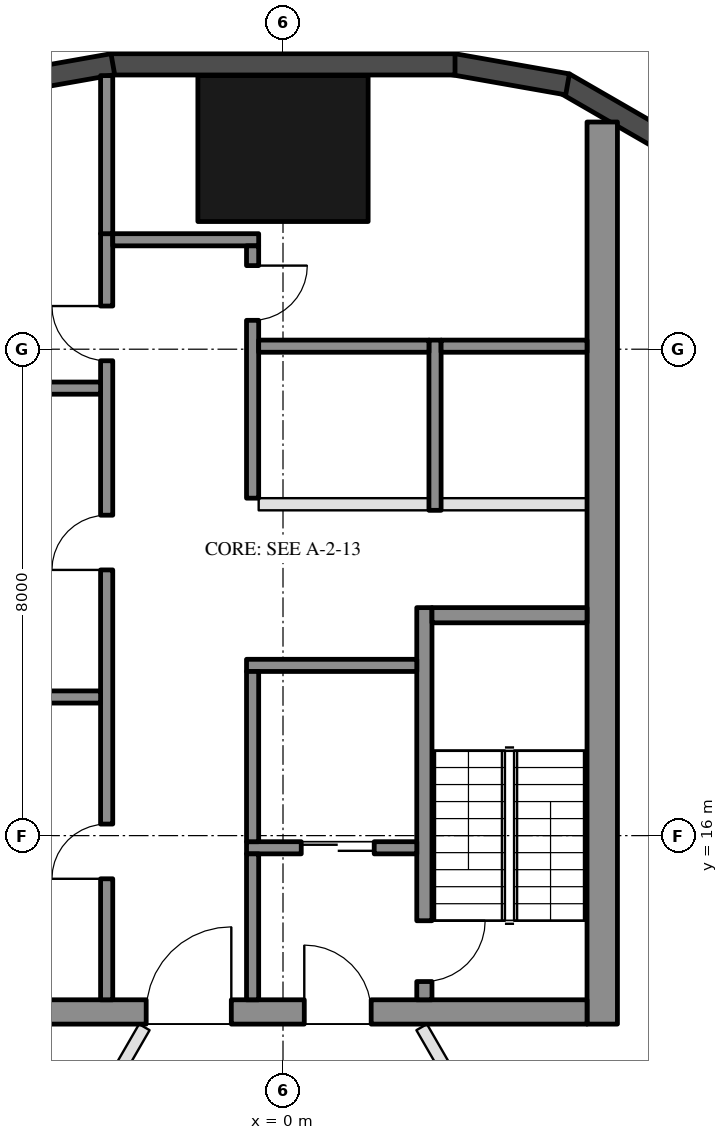
"""IFC4 building model, lengths in metres.
Left out: names, types, materials, properties, quantities, classifications, styles, units other than length and angle.
Written with IfcOpenShell. Run it as: python <this file> out.ifc"""

import sys

from ifc_helpers import new_model, si_unit, direction, frame, frame_2d, origin, origin_2d, place, context, subcontext, project, spatial, rectangle, hollow_rectangle, extrude, element, fill, save


model = new_model("IFC4")
c1 = context("Model", 3, precision=1e-05, world=origin(), true_north=direction((0.0, 1.0)))
c2 = subcontext(c1, "Body", "Model", "MODEL_VIEW")
j1 = project(units=[si_unit("LENGTHUNIT", "METRE"), si_unit("PLANEANGLEUNIT", "RADIAN")], contexts=[c1])
p1 = place(None, origin())
s1 = spatial("IfcSite", under=j1, at=p1, CompositionType="ELEMENT")
p2 = place(p1, origin())
s2 = spatial("IfcBuilding", under=s1, at=p2, CompositionType="ELEMENT")
p3 = place(p2, frame((0.0, 0.0, 65.0)))
s3 = spatial("IfcBuildingStorey", under=s2, at=p3, CompositionType="ELEMENT", Elevation=65.0)
p4 = place(p3, frame((0.0, 27.3, 0.0), z_axis=(0.0, 0.0, 1.0), x_axis=(1.0, 0.0, 0.0)))
e1 = element("IfcColumn", 1, at=p4, inside=s3, PredefinedType="COLUMN", context=c2, shape_type="SweptSolid", body=[
    extrude(hollow_rectangle(XDim=2.8, YDim=2.4, WallThickness=0.07, at=origin_2d()), origin(), (0.0, 0.0, 1.0), 3.7),
])
for number, where, z_axis, x_axis in (
    (2, (6.277, 27.422, 0.0), (0.0, 0.0, 1.0), (-0.866, 0.5, 0.0)),
    (3, (4.68, 28.356, 0.0), (0.0, 0.0, 1.0), (-0.985, 0.174, 0.0)),
):
    element("IfcWall", number, at=place(p3, frame(where, z_axis=z_axis, x_axis=x_axis)), inside=s3, PredefinedType="SOLIDWALL", context=c2, shape_type="SweptSolid", body=[
        extrude(rectangle(XDim=1.91, YDim=0.35, at=frame_2d((0.955, 0.0))), origin(), (0.0, 0.0, 1.0), 3.55),
    ])
p5 = place(p3, frame((2.829, 28.685, 0.0), z_axis=(0.0, 0.0, 1.0), x_axis=(-1.0, 0.0, 0.0)))
e4 = element("IfcWall", 4, at=p5, inside=s3, PredefinedType="SOLIDWALL", context=c2, shape_type="SweptSolid", body=[
    extrude(rectangle(XDim=5.658, YDim=0.35, at=frame_2d((2.829, 0.0))), origin(), (0.0, 0.0, 1.0), 3.55),
])
p6 = place(p3, frame((-2.799, 28.688, 0.0), z_axis=(0.0, 0.0, 1.0), x_axis=(-0.984798995425, -0.173697837091, 0.0)))
e5 = element("IfcWall", 5, at=p6, inside=s3, PredefinedType="SOLIDWALL", context=c2, shape_type="SweptSolid", body=[
    extrude(rectangle(XDim=1.91, YDim=0.35, at=frame_2d((0.955, 0.0))), origin(), (0.0, 0.0, 1.0), 3.55),
])
p7 = place(p3, frame((5.25, 12.9, 0.0), z_axis=(0.0, 0.0, 1.0), x_axis=(0.0, 1.0, 0.0)))
e6 = element("IfcWall", 6, at=p7, inside=s3, PredefinedType="SHEAR", context=c2, shape_type="SweptSolid", body=[
    extrude(rectangle(XDim=14.837, YDim=0.5, at=frame_2d((7.418, 0.0))), origin(), (0.0, 0.0, 1.0), 3.5),
])
p8 = place(p3, frame((5.0, 13.1, 0.0), z_axis=(0.0, 0.0, 1.0), x_axis=(-1.0, 0.0, 0.0)))
e7 = element("IfcWall", 7, at=p8, inside=s3, PredefinedType="SHEAR", context=c2, shape_type="SweptSolid", body=[
    extrude(rectangle(XDim=10.0, YDim=0.4, at=frame_2d((5.0, 0.0))), origin(), (0.0, 0.0, 1.0), 3.5),
])
p9 = place(p8, frame((3.55, 0.0, 0.0)))
e8 = element("IfcOpeningElement", 8, at=p9, cuts=e7, PredefinedType="OPENING", context=c2, shape_type="SweptSolid", body=[
    extrude(rectangle(XDim=1.1, YDim=2.1, at=frame_2d((0.55, 1.05))), frame((0.0, 0.21, 0.0), z_axis=(0.0, -1.0, 0.0), x_axis=(1.0, 0.0, 0.0)), (0.0, 0.0, 1.0), 0.42),
])
p10 = place(p8, frame((5.85, 0.0, 0.0)))
e9 = element("IfcOpeningElement", 9, at=p10, cuts=e7, PredefinedType="OPENING", context=c2, shape_type="SweptSolid", body=[
    extrude(rectangle(XDim=1.4, YDim=2.1, at=frame_2d((0.7, 1.05))), frame((0.0, 0.21, 0.0), z_axis=(0.0, -1.0, 0.0), x_axis=(1.0, 0.0, 0.0)), (0.0, 0.0, 1.0), 0.42),
])
p11 = place(p3, frame((2.325, 13.3, 0.0), z_axis=(0.0, 0.0, 1.0), x_axis=(0.0, 1.0, 0.0)))
e10 = element("IfcWall", 10, at=p11, inside=s3, PredefinedType="SHEAR", context=c2, shape_type="SweptSolid", body=[
    extrude(rectangle(XDim=6.45, YDim=0.25, at=frame_2d((3.225, 0.0))), origin(), (0.0, 0.0, 1.0), 3.5),
])
p12 = place(p11, frame((0.3, 0.0, 0.0)))
e11 = element("IfcOpeningElement", 11, at=p12, cuts=e10, PredefinedType="OPENING", context=c2, shape_type="SweptSolid", body=[
    extrude(rectangle(XDim=1.0, YDim=2.1, at=frame_2d((0.5, 1.05))), frame((0.0, 0.135, 0.0), z_axis=(0.0, -1.0, 0.0), x_axis=(1.0, 0.0, 0.0)), (0.0, 0.0, 1.0), 0.27),
])
p13 = place(p3, frame((5.0, 19.625, 0.0), z_axis=(0.0, 0.0, 1.0), x_axis=(-1.0, 0.0, 0.0)))
e12 = element("IfcWall", 12, at=p13, inside=s3, PredefinedType="SHEAR", context=c2, shape_type="SweptSolid", body=[
    extrude(rectangle(XDim=2.55, YDim=0.25, at=frame_2d((1.275, 0.0))), origin(), (0.0, 0.0, 1.0), 3.5),
])
p14 = place(p3, frame((2.2, 18.8, 0.0), z_axis=(0.0, 0.0, 1.0), x_axis=(-1.0, 0.0, 0.0)))
e13 = element("IfcWall", 13, at=p14, inside=s3, PredefinedType="SHEAR", context=c2, shape_type="SweptSolid", body=[
    extrude(rectangle(XDim=2.8, YDim=0.2, at=frame_2d((1.4, 0.0))), origin(), (0.0, 0.0, 1.0), 3.5),
])
p15 = place(p3, frame((2.2, 15.8, 0.0), z_axis=(0.0, 0.0, 1.0), x_axis=(-1.0, 0.0, 0.0)))
e14 = element("IfcWall", 14, at=p15, inside=s3, PredefinedType="SHEAR", context=c2, shape_type="SweptSolid", body=[
    extrude(rectangle(XDim=2.8, YDim=0.2, at=frame_2d((1.4, 0.0))), origin(), (0.0, 0.0, 1.0), 3.5),
])
p16 = place(p15, frame((0.7, 0.0, 0.0)))
e15 = element("IfcOpeningElement", 15, at=p16, cuts=e14, PredefinedType="OPENING", context=c2, shape_type="SweptSolid", body=[
    extrude(rectangle(XDim=1.2, YDim=2.1, at=frame_2d((0.6, 1.05))), frame((0.0, 0.11, 0.0), z_axis=(0.0, -1.0, 0.0), x_axis=(1.0, 0.0, 0.0)), (0.0, 0.0, 1.0), 0.22),
])
p17 = place(p3, frame((-0.5, 15.9, 0.0), z_axis=(0.0, 0.0, 1.0), x_axis=(0.0, 1.0, 0.0)))
e16 = element("IfcWall", 16, at=p17, inside=s3, PredefinedType="SHEAR", context=c2, shape_type="SweptSolid", body=[
    extrude(rectangle(XDim=2.8, YDim=0.2, at=frame_2d((1.4, 0.0))), origin(), (0.0, 0.0, 1.0), 3.5),
])
p18 = place(p3, frame((-0.5, 13.3, 0.0), z_axis=(0.0, 0.0, 1.0), x_axis=(0.0, 1.0, 0.0)))
e17 = element("IfcWall", 17, at=p18, inside=s3, PredefinedType="SHEAR", context=c2, shape_type="SweptSolid", body=[
    extrude(rectangle(XDim=2.4, YDim=0.2, at=frame_2d((1.2, 0.0))), origin(), (0.0, 0.0, 1.0), 3.5),
])
p19 = place(p3, frame((-2.9, 13.3, 0.0), z_axis=(0.0, 0.0, 1.0), x_axis=(0.0, 1.0, 0.0)))
e18 = element("IfcWall", 18, at=p19, inside=s3, PredefinedType="SHEAR", context=c2, shape_type="SweptSolid", body=[
    extrude(rectangle(XDim=12.6, YDim=0.2, at=frame_2d((6.3, 0.0))), origin(), (0.0, 0.0, 1.0), 3.5),
])
p20 = place(p19, frame((1.99, 0.0, 0.0)))
e19 = element("IfcOpeningElement", 19, at=p20, cuts=e18, PredefinedType="OPENING", context=c2, shape_type="SweptSolid", body=[
    extrude(rectangle(XDim=0.9, YDim=2.1, at=frame_2d((0.45, 1.05))), frame((0.0, 0.11, 0.0), z_axis=(0.0, -1.0, 0.0), x_axis=(1.0, 0.0, 0.0)), (0.0, 0.0, 1.0), 0.22),
])
p21 = place(p19, frame((7.07, 0.0, 0.0)))
e20 = element("IfcOpeningElement", 20, at=p21, cuts=e18, PredefinedType="OPENING", context=c2, shape_type="SweptSolid", body=[
    extrude(rectangle(XDim=0.9, YDim=2.1, at=frame_2d((0.45, 1.05))), frame((0.0, 0.11, 0.0), z_axis=(0.0, -1.0, 0.0), x_axis=(1.0, 0.0, 0.0)), (0.0, 0.0, 1.0), 0.22),
])
p22 = place(p19, frame((10.51, 0.0, 0.0)))
e21 = element("IfcOpeningElement", 21, at=p22, cuts=e18, PredefinedType="OPENING", context=c2, shape_type="SweptSolid", body=[
    extrude(rectangle(XDim=0.9, YDim=2.1, at=frame_2d((0.45, 1.05))), frame((0.0, 0.11, 0.0), z_axis=(0.0, -1.0, 0.0), x_axis=(1.0, 0.0, 0.0)), (0.0, 0.0, 1.0), 0.22),
])
p23 = place(p3, frame((-0.4, 25.8, 0.0), z_axis=(0.0, 0.0, 1.0), x_axis=(-1.0, 0.0, 0.0)))
e22 = element("IfcWall", 22, at=p23, inside=s3, PredefinedType="SHEAR", context=c2, shape_type="SweptSolid", body=[
    extrude(rectangle(XDim=2.4, YDim=0.2, at=frame_2d((1.2, 0.0))), origin(), (0.0, 0.0, 1.0), 3.5),
])
p24 = place(p3, frame((-0.5, 21.55, 0.0), z_axis=(0.0, 0.0, 1.0), x_axis=(0.0, 1.0, 0.0)))
e23 = element("IfcWall", 23, at=p24, inside=s3, PredefinedType="SHEAR", context=c2, shape_type="SweptSolid", body=[
    extrude(rectangle(XDim=4.15, YDim=0.2, at=frame_2d((2.075, 0.0))), origin(), (0.0, 0.0, 1.0), 3.5),
])
p25 = place(p24, frame((2.925, 0.0, 0.0)))
e24 = element("IfcOpeningElement", 24, at=p25, cuts=e23, PredefinedType="OPENING", context=c2, shape_type="SweptSolid", body=[
    extrude(rectangle(XDim=0.9, YDim=2.1, at=frame_2d((0.45, 1.05))), frame((0.0, 0.11, 0.0), z_axis=(0.0, -1.0, 0.0), x_axis=(1.0, 0.0, 0.0)), (0.0, 0.0, 1.0), 0.22),
])
for number, where, z_axis, x_axis in (
    (25, (-3.0, 18.28, 0.0), (0.0, 0.0, 1.0), (-1.0, 0.0, 0.0)),
    (26, (-3.0, 23.36, 0.0), (0.0, 0.0, 1.0), (-1.0, 0.0, 0.0)),
):
    element("IfcWall", number, at=place(p3, frame(where, z_axis=z_axis, x_axis=x_axis)), inside=s3, PredefinedType="SHEAR", context=c2, shape_type="SweptSolid", body=[
        extrude(rectangle(XDim=2.0, YDim=0.2, at=frame_2d((1.0, 0.0))), origin(), (0.0, 0.0, 1.0), 3.5),
    ])
p26 = place(p3, frame((-2.9, 25.9, 0.0), z_axis=(0.0, 0.0, 1.0), x_axis=(0.0, 1.0, 0.0)))
e27 = element("IfcWall", 27, at=p26, inside=s3, PredefinedType="SHEAR", context=c2, shape_type="SweptSolid", body=[
    extrude(rectangle(XDim=2.6, YDim=0.2, at=frame_2d((1.3, 0.0))), origin(), (0.0, 0.0, 1.0), 3.5),
])
p27 = place(p3, frame((2.5, 21.35, 0.0), z_axis=(0.0, 0.0, 1.0), x_axis=(0.0, 1.0, 0.0)))
e28 = element("IfcWall", 28, at=p27, inside=s3, PredefinedType="SHEAR", context=c2, shape_type="SweptSolid", body=[
    extrude(rectangle(XDim=2.8, YDim=0.2, at=frame_2d((1.4, 0.0))), origin(), (0.0, 0.0, 1.0), 3.5),
])
p28 = place(p3, frame((5.0, 24.05, 0.0), z_axis=(0.0, 0.0, 1.0), x_axis=(-1.0, 0.0, 0.0)))
e29 = element("IfcWall", 29, at=p28, inside=s3, PredefinedType="SHEAR", context=c2, shape_type="SweptSolid", body=[
    extrude(rectangle(XDim=2.4, YDim=0.2, at=frame_2d((1.2, 0.0))), origin(), (0.0, 0.0, 1.0), 3.5),
])
p29 = place(p3, frame((2.4, 24.05, 0.0), z_axis=(0.0, 0.0, 1.0), x_axis=(-1.0, 0.0, 0.0)))
e30 = element("IfcWall", 30, at=p29, inside=s3, PredefinedType="SHEAR", context=c2, shape_type="SweptSolid", body=[
    extrude(rectangle(XDim=2.8, YDim=0.2, at=frame_2d((1.4, 0.0))), origin(), (0.0, 0.0, 1.0), 3.5),
])
p30 = place(p3, frame((5.0, 21.45, 0.0), z_axis=(0.0, 0.0, 1.0), x_axis=(-1.0, 0.0, 0.0)))
e31 = element("IfcWall", 31, at=p30, inside=s3, PredefinedType="PARTITIONING", context=c2, shape_type="SweptSolid", body=[
    extrude(rectangle(XDim=2.4, YDim=0.2, at=frame_2d((1.2, 0.0))), origin(), (0.0, 0.0, 1.0), 3.5),
])
p31 = place(p3, frame((2.4, 21.45, 0.0), z_axis=(0.0, 0.0, 1.0), x_axis=(-1.0, 0.0, 0.0)))
e32 = element("IfcWall", 32, at=p31, inside=s3, PredefinedType="PARTITIONING", context=c2, shape_type="SweptSolid", body=[
    extrude(rectangle(XDim=2.8, YDim=0.2, at=frame_2d((1.4, 0.0))), origin(), (0.0, 0.0, 1.0), 3.5),
])
p32 = place(p3, frame((2.281, 12.85, 0.0), z_axis=(0.0, 0.0, 1.0), x_axis=(0.499992939664, -0.866029480033, 0.0)))
e33 = element("IfcWall", 33, at=p32, inside=s3, PredefinedType="PARTITIONING", context=c2, shape_type="SweptSolid", body=[
    extrude(rectangle(XDim=7.188, YDim=0.2, at=frame_2d((3.594, 0.0))), origin(), (0.0, 0.0, 1.0), 2.95),
])
p33 = place(p32, frame((3.094, 0.0, 0.0)))
e34 = element("IfcOpeningElement", 34, at=p33, cuts=e33, PredefinedType="OPENING", context=c2, shape_type="SweptSolid", body=[
    extrude(rectangle(XDim=1.0, YDim=2.1, at=frame_2d((0.5, 1.05))), frame((0.0, 0.11, 0.0), z_axis=(0.0, -1.0, 0.0), x_axis=(1.0, 0.0, 0.0)), (0.0, 0.0, 1.0), 0.22),
])
p34 = place(p3, frame((-5.922, 6.542, 0.0), z_axis=(0.0, 0.0, 1.0), x_axis=(0.499989401968, 0.866031522475, 0.0)))
e35 = element("IfcWall", 35, at=p34, inside=s3, PredefinedType="PARTITIONING", context=c2, shape_type="SweptSolid", body=[
    extrude(rectangle(XDim=7.283, YDim=0.2, at=frame_2d((3.642, 0.0))), origin(), (0.0, 0.0, 1.0), 2.95),
])
p35 = place(p34, frame((3.142, 0.0, 0.0)))
e36 = element("IfcOpeningElement", 36, at=p35, cuts=e35, PredefinedType="OPENING", context=c2, shape_type="SweptSolid", body=[
    extrude(rectangle(XDim=1.0, YDim=2.1, at=frame_2d((0.5, 1.05))), frame((0.0, 0.11, 0.0), z_axis=(0.0, -1.0, 0.0), x_axis=(1.0, 0.0, 0.0)), (0.0, 0.0, 1.0), 0.22),
])
p36 = place(p16, origin())
e37 = element("IfcDoor", 37, at=p36, inside=s3, OperationType="DOUBLE_DOOR_SLIDING", PredefinedType="DOOR", context=c2, shape_type="SweptSolid", body=[
    extrude(rectangle(XDim=1.2, YDim=2.1, at=frame_2d((0.6, 1.05))), frame((0.0, 0.025, 0.0), z_axis=(0.0, -1.0, 0.0), x_axis=(1.0, 0.0, 0.0)), (0.0, 0.0, 1.0), 0.05),
])
fill(e15, e37)
p37 = place(p20, origin())
e38 = element("IfcDoor", 38, at=p37, inside=s3, OperationType="SINGLE_SWING_LEFT", PredefinedType="DOOR", context=c2, shape_type="SweptSolid", body=[
    extrude(rectangle(XDim=0.9, YDim=2.1, at=frame_2d((0.45, 1.05))), frame((0.0, 0.025, 0.0), z_axis=(0.0, -1.0, 0.0), x_axis=(1.0, 0.0, 0.0)), (0.0, 0.0, 1.0), 0.05),
])
fill(e19, e38)
p38 = place(p21, origin())
e39 = element("IfcDoor", 39, at=p38, inside=s3, OperationType="SINGLE_SWING_LEFT", PredefinedType="DOOR", context=c2, shape_type="SweptSolid", body=[
    extrude(rectangle(XDim=0.9, YDim=2.1, at=frame_2d((0.45, 1.05))), frame((0.0, 0.025, 0.0), z_axis=(0.0, -1.0, 0.0), x_axis=(1.0, 0.0, 0.0)), (0.0, 0.0, 1.0), 0.05),
])
fill(e20, e39)
p39 = place(p22, origin())
e40 = element("IfcDoor", 40, at=p39, inside=s3, OperationType="SINGLE_SWING_RIGHT", PredefinedType="DOOR", context=c2, shape_type="SweptSolid", body=[
    extrude(rectangle(XDim=0.9, YDim=2.1, at=frame_2d((0.45, 1.05))), frame((0.0, 0.025, 0.0), z_axis=(0.0, -1.0, 0.0), x_axis=(1.0, 0.0, 0.0)), (0.0, 0.0, 1.0), 0.05),
])
fill(e21, e40)
p40 = place(p25, frame((0.9, 0.0, 0.0), z_axis=(0.0, 0.0, 1.0), x_axis=(-1.0, 0.0, 0.0)))
e41 = element("IfcDoor", 41, at=p40, inside=s3, OperationType="SINGLE_SWING_LEFT", PredefinedType="DOOR", context=c2, shape_type="SweptSolid", body=[
    extrude(rectangle(XDim=0.9, YDim=2.1, at=frame_2d((0.45, 1.05))), frame((0.0, 0.025, 0.0), z_axis=(0.0, -1.0, 0.0), x_axis=(1.0, 0.0, 0.0)), (0.0, 0.0, 1.0), 0.05),
])
fill(e24, e41)
p41 = place(p9, frame((1.1, 0.0, 0.0), z_axis=(0.0, 0.0, 1.0), x_axis=(-1.0, 0.0, 0.0)))
e42 = element("IfcDoor", 42, at=p41, inside=s3, OperationType="SINGLE_SWING_LEFT", PredefinedType="DOOR", context=c2, shape_type="SweptSolid", body=[
    extrude(rectangle(XDim=1.1, YDim=2.1, at=frame_2d((0.55, 1.05))), frame((0.0, 0.025, 0.0), z_axis=(0.0, -1.0, 0.0), x_axis=(1.0, 0.0, 0.0)), (0.0, 0.0, 1.0), 0.05),
])
fill(e8, e42)
p42 = place(p10, frame((1.4, 0.0, 0.0), z_axis=(0.0, 0.0, 1.0), x_axis=(-1.0, 0.0, 0.0)))
e43 = element("IfcDoor", 43, at=p42, inside=s3, OperationType="DOUBLE_DOOR_SINGLE_SWING", PredefinedType="DOOR", context=c2, shape_type="SweptSolid", body=[
    extrude(rectangle(XDim=1.4, YDim=2.1, at=frame_2d((0.7, 1.05))), frame((0.0, 0.025, 0.0), z_axis=(0.0, -1.0, 0.0), x_axis=(1.0, 0.0, 0.0)), (0.0, 0.0, 1.0), 0.05),
])
fill(e9, e43)
p43 = place(p12, frame((1.0, 0.0, 0.0), z_axis=(0.0, 0.0, 1.0), x_axis=(-1.0, 0.0, 0.0)))
e44 = element("IfcDoor", 44, at=p43, inside=s3, OperationType="SINGLE_SWING_LEFT", PredefinedType="DOOR", context=c2, shape_type="SweptSolid", body=[
    extrude(rectangle(XDim=1.0, YDim=2.1, at=frame_2d((0.5, 1.05))), frame((0.0, 0.025, 0.0), z_axis=(0.0, -1.0, 0.0), x_axis=(1.0, 0.0, 0.0)), (0.0, 0.0, 1.0), 0.05),
])
fill(e11, e44)
save(model, sys.argv[1])
